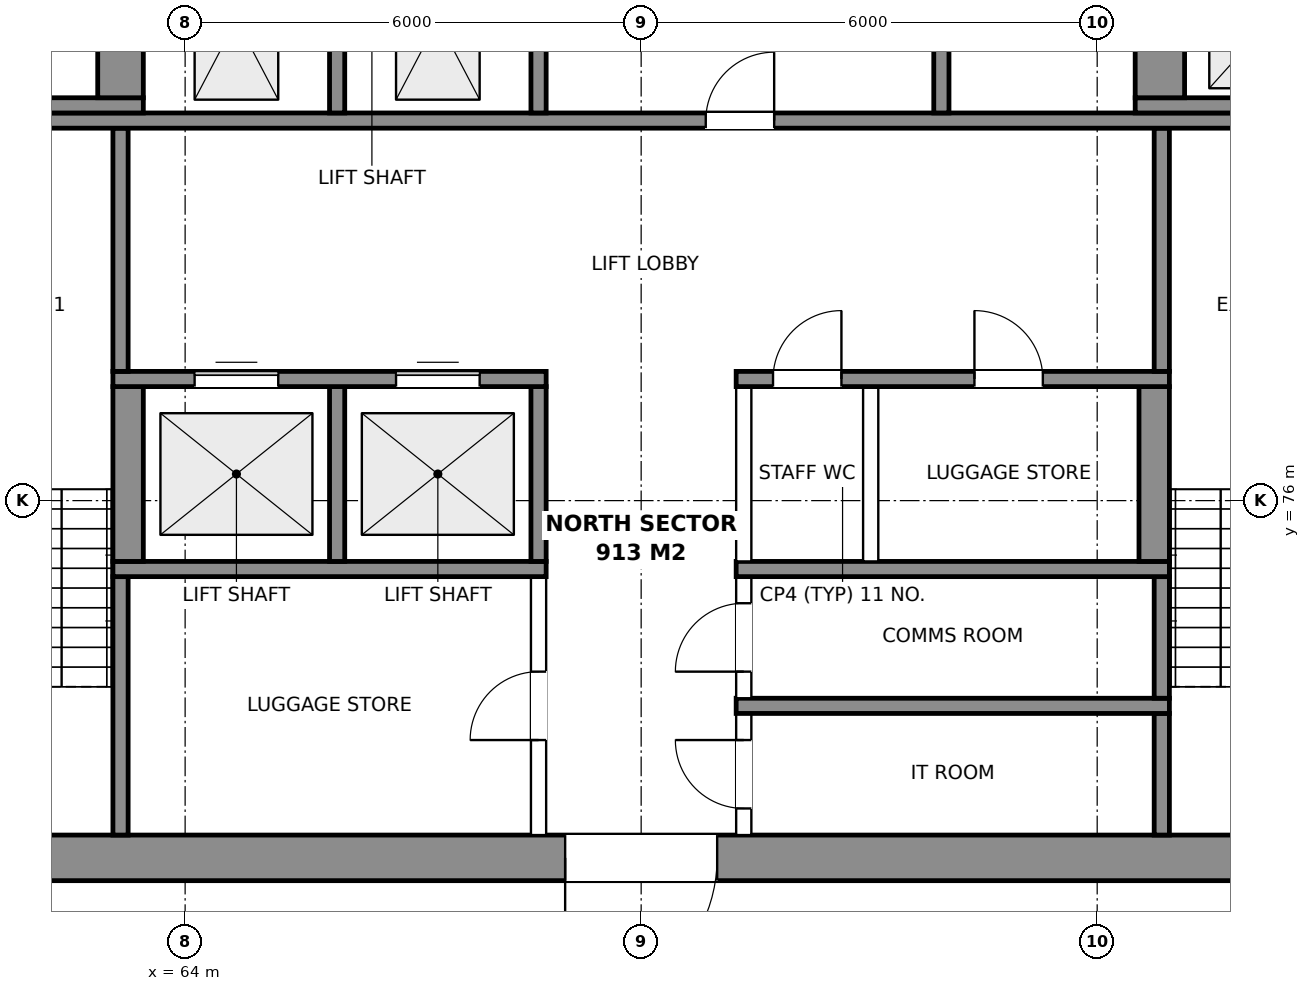
"""IFC4 building model, lengths in metres.
Left out: names, types, materials, properties, quantities, classifications, styles, units other than length and angle.
Written with IfcOpenShell. Run it as: python <this file> out.ifc"""

import sys

from ifc_helpers import new_model, si_unit, direction, frame, frame_2d, origin, place, context, subcontext, project, spatial, rectangle, extrude, element, fill, save


model = new_model("IFC4")
c1 = context("Model", 3, precision=1e-05, world=origin(), true_north=direction((0.0, 1.0)))
c2 = subcontext(c1, "Body", "Model", "MODEL_VIEW")
j1 = project(units=[si_unit("LENGTHUNIT", "METRE"), si_unit("PLANEANGLEUNIT", "RADIAN")], contexts=[c1])
p1 = place(None, origin())
s1 = spatial("IfcSite", under=j1, at=p1, CompositionType="ELEMENT")
p2 = place(p1, origin())
s2 = spatial("IfcBuilding", under=s1, at=p2, CompositionType="ELEMENT")
p3 = place(p2, frame((0.0, 0.0, 313.9)))
s3 = spatial("IfcBuildingStorey", under=s2, at=p3, CompositionType="ELEMENT", Elevation=313.9)
p4 = place(p3, frame((59.0, 71.3, 0.0), z_axis=(0.0, 0.0, 1.0), x_axis=(1.0, 0.0, 0.0)))
e1 = element("IfcWall", 1, at=p4, inside=s3, PredefinedType="SHEAR", context=c2, shape_type="SweptSolid", body=[
    extrude(rectangle(XDim=22.0, YDim=0.6, at=frame_2d((11.0, 0.0))), origin(), (0.0, 0.0, 1.0), 3.9),
])
p5 = place(p4, frame((2.025, 0.0, 0.0)))
e2 = element("IfcOpeningElement", 2, at=p5, cuts=e1, PredefinedType="OPENING", context=c2, shape_type="SweptSolid", body=[
    extrude(rectangle(XDim=1.2, YDim=2.1, at=frame_2d((0.6, 1.05))), frame((0.0, 0.31, 0.0), z_axis=(0.0, -1.0, 0.0), x_axis=(1.0, 0.0, 0.0)), (0.0, 0.0, 1.0), 0.62),
])
p6 = place(p4, frame((18.775, 0.0, 0.0)))
e3 = element("IfcOpeningElement", 3, at=p6, cuts=e1, PredefinedType="OPENING", context=c2, shape_type="SweptSolid", body=[
    extrude(rectangle(XDim=1.2, YDim=2.1, at=frame_2d((0.6, 1.05))), frame((0.0, 0.31, 0.0), z_axis=(0.0, -1.0, 0.0), x_axis=(1.0, 0.0, 0.0)), (0.0, 0.0, 1.0), 0.62),
])
p7 = place(p4, frame((10.0, 0.0, 0.0)))
e4 = element("IfcOpeningElement", 4, at=p7, cuts=e1, PredefinedType="OPENING", context=c2, shape_type="SweptSolid", body=[
    extrude(rectangle(XDim=2.0, YDim=2.1, at=frame_2d((1.0, 1.05))), frame((0.0, 0.31, 0.0), z_axis=(0.0, -1.0, 0.0), x_axis=(1.0, 0.0, 0.0)), (0.0, 0.0, 1.0), 0.62),
])
p8 = place(p3, frame((63.15, 71.6, 0.0), z_axis=(0.0, 0.0, 1.0), x_axis=(0.0, 1.0, 0.0)))
e5 = element("IfcWall", 5, at=p8, inside=s3, PredefinedType="SHEAR", context=c2, shape_type="SweptSolid", body=[
    extrude(rectangle(XDim=3.4, YDim=0.2, at=frame_2d((1.7, 0.0))), origin(), (0.0, 0.0, 1.0), 3.9),
])
p9 = place(p3, frame((68.65, 71.6, 0.0), z_axis=(0.0, 0.0, 1.0), x_axis=(0.0, 1.0, 0.0)))
e6 = element("IfcWall", 6, at=p9, inside=s3, PredefinedType="PARTITIONING", context=c2, shape_type="SweptSolid", body=[
    extrude(rectangle(XDim=3.4, YDim=0.2, at=frame_2d((1.7, 0.0))), origin(), (0.0, 0.0, 1.0), 3.6),
])
p10 = place(p9, frame((1.25, 0.0, 0.0)))
e7 = element("IfcOpeningElement", 7, at=p10, cuts=e6, PredefinedType="OPENING", context=c2, shape_type="SweptSolid", body=[
    extrude(rectangle(XDim=0.9, YDim=2.1, at=frame_2d((0.45, 1.05))), frame((0.0, 0.11, 0.0), z_axis=(0.0, -1.0, 0.0), x_axis=(1.0, 0.0, 0.0)), (0.0, 0.0, 1.0), 0.22),
])
p11 = place(p3, frame((71.35, 71.6, 0.0), z_axis=(0.0, 0.0, 1.0), x_axis=(0.0, 1.0, 0.0)))
e8 = element("IfcWall", 8, at=p11, inside=s3, PredefinedType="PARTITIONING", context=c2, shape_type="SweptSolid", body=[
    extrude(rectangle(XDim=1.6, YDim=0.2, at=frame_2d((0.8, 0.0))), origin(), (0.0, 0.0, 1.0), 3.6),
])
p12 = place(p11, frame((0.35, 0.0, 0.0)))
e9 = element("IfcOpeningElement", 9, at=p12, cuts=e8, PredefinedType="OPENING", context=c2, shape_type="SweptSolid", body=[
    extrude(rectangle(XDim=0.9, YDim=2.1, at=frame_2d((0.45, 1.05))), frame((0.0, 0.11, 0.0), z_axis=(0.0, -1.0, 0.0), x_axis=(1.0, 0.0, 0.0)), (0.0, 0.0, 1.0), 0.22),
])
p13 = place(p3, frame((76.85, 71.6, 0.0), z_axis=(0.0, 0.0, 1.0), x_axis=(0.0, 1.0, 0.0)))
e10 = element("IfcWall", 10, at=p13, inside=s3, PredefinedType="SHEAR", context=c2, shape_type="SweptSolid", body=[
    extrude(rectangle(XDim=1.6, YDim=0.2, at=frame_2d((0.8, 0.0))), origin(), (0.0, 0.0, 1.0), 3.9),
])
p14 = place(p3, frame((71.25, 73.3, 0.0), z_axis=(0.0, 0.0, 1.0), x_axis=(1.0, 0.0, 0.0)))
e11 = element("IfcWall", 11, at=p14, inside=s3, PredefinedType="SHEAR", context=c2, shape_type="SweptSolid", body=[
    extrude(rectangle(XDim=5.7, YDim=0.2, at=frame_2d((2.85, 0.0))), origin(), (0.0, 0.0, 1.0), 3.9),
])
p15 = place(p3, frame((71.35, 73.4, 0.0), z_axis=(0.0, 0.0, 1.0), x_axis=(0.0, 1.0, 0.0)))
e12 = element("IfcWall", 12, at=p15, inside=s3, PredefinedType="PARTITIONING", context=c2, shape_type="SweptSolid", body=[
    extrude(rectangle(XDim=1.6, YDim=0.2, at=frame_2d((0.8, 0.0))), origin(), (0.0, 0.0, 1.0), 3.6),
])
p16 = place(p15, frame((0.35, 0.0, 0.0)))
e13 = element("IfcOpeningElement", 13, at=p16, cuts=e12, PredefinedType="OPENING", context=c2, shape_type="SweptSolid", body=[
    extrude(rectangle(XDim=0.9, YDim=2.1, at=frame_2d((0.45, 1.05))), frame((0.0, 0.11, 0.0), z_axis=(0.0, -1.0, 0.0), x_axis=(1.0, 0.0, 0.0)), (0.0, 0.0, 1.0), 0.22),
])
p17 = place(p3, frame((76.85, 73.4, 0.0), z_axis=(0.0, 0.0, 1.0), x_axis=(0.0, 1.0, 0.0)))
e14 = element("IfcWall", 14, at=p17, inside=s3, PredefinedType="SHEAR", context=c2, shape_type="SweptSolid", body=[
    extrude(rectangle(XDim=1.6, YDim=0.2, at=frame_2d((0.8, 0.0))), origin(), (0.0, 0.0, 1.0), 3.9),
])
for number, where, z_axis, x_axis in (
    (15, (63.05, 75.1, 0.0), (0.0, 0.0, 1.0), (1.0, 0.0, 0.0)),
    (16, (71.25, 75.1, 0.0), (0.0, 0.0, 1.0), (1.0, 0.0, 0.0)),
):
    element("IfcWall", number, at=place(p3, frame(where, z_axis=z_axis, x_axis=x_axis)), inside=s3, PredefinedType="SHEAR", context=c2, shape_type="SweptSolid", body=[
        extrude(rectangle(XDim=5.7, YDim=0.2, at=frame_2d((2.85, 0.0))), origin(), (0.0, 0.0, 1.0), 3.9),
    ])
p18 = place(p3, frame((63.25, 75.2, 0.0), z_axis=(0.0, 0.0, 1.0), x_axis=(0.0, 1.0, 0.0)))
e17 = element("IfcWall", 17, at=p18, inside=s3, PredefinedType="SHEAR", context=c2, shape_type="SweptSolid", body=[
    extrude(rectangle(XDim=2.3, YDim=0.4, at=frame_2d((1.15, 0.0))), origin(), (0.0, 0.0, 1.0), 3.9),
])
for number, where, z_axis, x_axis in (
    (18, (66.0, 75.2, 0.0), (0.0, 0.0, 1.0), (0.0, 1.0, 0.0)),
    (19, (68.65, 75.2, 0.0), (0.0, 0.0, 1.0), (0.0, 1.0, 0.0)),
):
    element("IfcWall", number, at=place(p3, frame(where, z_axis=z_axis, x_axis=x_axis)), inside=s3, PredefinedType="SHEAR", context=c2, shape_type="SweptSolid", body=[
        extrude(rectangle(XDim=2.3, YDim=0.2, at=frame_2d((1.15, 0.0))), origin(), (0.0, 0.0, 1.0), 3.9),
    ])
for number, where, z_axis, x_axis in (
    (20, (71.35, 75.2, 0.0), (0.0, 0.0, 1.0), (0.0, 1.0, 0.0)),
    (21, (73.02, 75.2, 0.0), (0.0, 0.0, 1.0), (0.0, 1.0, 0.0)),
):
    element("IfcWall", number, at=place(p3, frame(where, z_axis=z_axis, x_axis=x_axis)), inside=s3, PredefinedType="PARTITIONING", context=c2, shape_type="SweptSolid", body=[
        extrude(rectangle(XDim=2.3, YDim=0.2, at=frame_2d((1.15, 0.0))), origin(), (0.0, 0.0, 1.0), 3.6),
    ])
p19 = place(p3, frame((76.75, 75.2, 0.0), z_axis=(0.0, 0.0, 1.0), x_axis=(0.0, 1.0, 0.0)))
e22 = element("IfcWall", 22, at=p19, inside=s3, PredefinedType="SHEAR", context=c2, shape_type="SweptSolid", body=[
    extrude(rectangle(XDim=2.3, YDim=0.4, at=frame_2d((1.15, 0.0))), origin(), (0.0, 0.0, 1.0), 3.9),
])
p20 = place(p3, frame((63.05, 77.6, 0.0), z_axis=(0.0, 0.0, 1.0), x_axis=(1.0, 0.0, 0.0)))
e23 = element("IfcWall", 23, at=p20, inside=s3, PredefinedType="SHEAR", context=c2, shape_type="SweptSolid", body=[
    extrude(rectangle(XDim=5.7, YDim=0.2, at=frame_2d((2.85, 0.0))), origin(), (0.0, 0.0, 1.0), 3.9),
])
p21 = place(p20, frame((1.075, 0.0, 0.0)))
e24 = element("IfcOpeningElement", 24, at=p21, cuts=e23, PredefinedType="OPENING", context=c2, shape_type="SweptSolid", body=[
    extrude(rectangle(XDim=1.1, YDim=2.1, at=frame_2d((0.55, 1.05))), frame((0.0, 0.11, 0.0), z_axis=(0.0, -1.0, 0.0), x_axis=(1.0, 0.0, 0.0)), (0.0, 0.0, 1.0), 0.22),
])
p22 = place(p20, frame((3.725, 0.0, 0.0)))
e25 = element("IfcOpeningElement", 25, at=p22, cuts=e23, PredefinedType="OPENING", context=c2, shape_type="SweptSolid", body=[
    extrude(rectangle(XDim=1.1, YDim=2.1, at=frame_2d((0.55, 1.05))), frame((0.0, 0.11, 0.0), z_axis=(0.0, -1.0, 0.0), x_axis=(1.0, 0.0, 0.0)), (0.0, 0.0, 1.0), 0.22),
])
p23 = place(p3, frame((71.25, 77.6, 0.0), z_axis=(0.0, 0.0, 1.0), x_axis=(1.0, 0.0, 0.0)))
e26 = element("IfcWall", 26, at=p23, inside=s3, PredefinedType="SHEAR", context=c2, shape_type="SweptSolid", body=[
    extrude(rectangle(XDim=5.7, YDim=0.2, at=frame_2d((2.85, 0.0))), origin(), (0.0, 0.0, 1.0), 3.9),
])
p24 = place(p23, frame((0.485, 0.0, 0.0)))
e27 = element("IfcOpeningElement", 27, at=p24, cuts=e26, PredefinedType="OPENING", context=c2, shape_type="SweptSolid", body=[
    extrude(rectangle(XDim=0.9, YDim=2.1, at=frame_2d((0.45, 1.05))), frame((0.0, 0.11, 0.0), z_axis=(0.0, -1.0, 0.0), x_axis=(1.0, 0.0, 0.0)), (0.0, 0.0, 1.0), 0.22),
])
p25 = place(p23, frame((3.135, 0.0, 0.0)))
e28 = element("IfcOpeningElement", 28, at=p25, cuts=e26, PredefinedType="OPENING", context=c2, shape_type="SweptSolid", body=[
    extrude(rectangle(XDim=0.9, YDim=2.1, at=frame_2d((0.45, 1.05))), frame((0.0, 0.11, 0.0), z_axis=(0.0, -1.0, 0.0), x_axis=(1.0, 0.0, 0.0)), (0.0, 0.0, 1.0), 0.22),
])
for number, where, z_axis, x_axis in (
    (29, (63.15, 77.7, 0.0), (0.0, 0.0, 1.0), (0.0, 1.0, 0.0)),
    (30, (76.85, 77.7, 0.0), (0.0, 0.0, 1.0), (0.0, 1.0, 0.0)),
):
    element("IfcWall", number, at=place(p3, frame(where, z_axis=z_axis, x_axis=x_axis)), inside=s3, PredefinedType="SHEAR", context=c2, shape_type="SweptSolid", body=[
        extrude(rectangle(XDim=3.2, YDim=0.2, at=frame_2d((1.6, 0.0))), origin(), (0.0, 0.0, 1.0), 3.9),
    ])
p26 = place(p3, frame((59.0, 81.0, 0.0), z_axis=(0.0, 0.0, 1.0), x_axis=(1.0, 0.0, 0.0)))
e31 = element("IfcWall", 31, at=p26, inside=s3, PredefinedType="SHEAR", context=c2, shape_type="SweptSolid", body=[
    extrude(rectangle(XDim=22.0, YDim=0.2, at=frame_2d((11.0, 0.0))), origin(), (0.0, 0.0, 1.0), 3.9),
])
p27 = place(p26, frame((11.85, 0.0, 0.0)))
e32 = element("IfcOpeningElement", 32, at=p27, cuts=e31, PredefinedType="OPENING", context=c2, shape_type="SweptSolid", body=[
    extrude(rectangle(XDim=0.9, YDim=2.1, at=frame_2d((0.45, 1.05))), frame((0.0, 0.11, 0.0), z_axis=(0.0, -1.0, 0.0), x_axis=(1.0, 0.0, 0.0)), (0.0, 0.0, 1.0), 0.22),
])
p28 = place(p3, frame((59.0, 81.2, 0.0), z_axis=(0.0, 0.0, 1.0), x_axis=(1.0, 0.0, 0.0)))
e33 = element("IfcWall", 33, at=p28, inside=s3, PredefinedType="SHEAR", context=c2, shape_type="SweptSolid", body=[
    extrude(rectangle(XDim=4.45, YDim=0.2, at=frame_2d((2.225, 0.0))), origin(), (0.0, 0.0, 1.0), 3.9),
])
for number, where, z_axis, x_axis in (
    (34, (66.0, 81.1, 0.0), (0.0, 0.0, 1.0), (0.0, 1.0, 0.0)),
    (35, (68.65, 81.1, 0.0), (0.0, 0.0, 1.0), (0.0, 1.0, 0.0)),
    (36, (73.95, 81.1, 0.0), (0.0, 0.0, 1.0), (0.0, 1.0, 0.0)),
):
    element("IfcWall", number, at=place(p3, frame(where, z_axis=z_axis, x_axis=x_axis)), inside=s3, PredefinedType="SHEAR", context=c2, shape_type="SweptSolid", body=[
        extrude(rectangle(XDim=2.45, YDim=0.2, at=frame_2d((1.225, 0.0))), origin(), (0.0, 0.0, 1.0), 3.9),
    ])
p29 = place(p3, frame((76.5, 81.2, 0.0), z_axis=(0.0, 0.0, 1.0), x_axis=(1.0, 0.0, 0.0)))
e37 = element("IfcWall", 37, at=p29, inside=s3, PredefinedType="SHEAR", context=c2, shape_type="SweptSolid", body=[
    extrude(rectangle(XDim=4.5, YDim=0.2, at=frame_2d((2.25, 0.0))), origin(), (0.0, 0.0, 1.0), 3.9),
])
p30 = place(p3, frame((63.15, 81.3, 0.0), z_axis=(0.0, 0.0, 1.0), x_axis=(0.0, 1.0, 0.0)))
e38 = element("IfcWall", 38, at=p30, inside=s3, PredefinedType="SHEAR", context=c2, shape_type="SweptSolid", body=[
    extrude(rectangle(XDim=2.25, YDim=0.6, at=frame_2d((1.125, 0.0))), origin(), (0.0, 0.0, 1.0), 3.9),
])
p31 = place(p3, frame((76.825, 81.3, 0.0), z_axis=(0.0, 0.0, 1.0), x_axis=(0.0, 1.0, 0.0)))
e39 = element("IfcWall", 39, at=p31, inside=s3, PredefinedType="SHEAR", context=c2, shape_type="SweptSolid", body=[
    extrude(rectangle(XDim=2.25, YDim=0.65, at=frame_2d((1.125, 0.0))), origin(), (0.0, 0.0, 1.0), 3.9),
])
p32 = place(p7, frame((2.0, 0.0, 0.0), z_axis=(0.0, 0.0, 1.0), x_axis=(-1.0, 0.0, 0.0)))
e40 = element("IfcDoor", 40, at=p32, inside=s3, OperationType="DOUBLE_DOOR_SINGLE_SWING", PredefinedType="DOOR", context=c2, shape_type="SweptSolid", body=[
    extrude(rectangle(XDim=2.0, YDim=2.1, at=frame_2d((1.0, 1.05))), frame((0.0, 0.025, 0.0), z_axis=(0.0, -1.0, 0.0), x_axis=(1.0, 0.0, 0.0)), (0.0, 0.0, 1.0), 0.05),
])
fill(e4, e40)
p33 = place(p10, origin())
e41 = element("IfcDoor", 41, at=p33, inside=s3, OperationType="SINGLE_SWING_LEFT", PredefinedType="DOOR", context=c2, shape_type="SweptSolid", body=[
    extrude(rectangle(XDim=0.9, YDim=2.1, at=frame_2d((0.45, 1.05))), frame((0.0, 0.025, 0.0), z_axis=(0.0, -1.0, 0.0), x_axis=(1.0, 0.0, 0.0)), (0.0, 0.0, 1.0), 0.05),
])
fill(e7, e41)
p34 = place(p12, origin())
e42 = element("IfcDoor", 42, at=p34, inside=s3, OperationType="SINGLE_SWING_RIGHT", PredefinedType="DOOR", context=c2, shape_type="SweptSolid", body=[
    extrude(rectangle(XDim=0.9, YDim=2.1, at=frame_2d((0.45, 1.05))), frame((0.0, 0.025, 0.0), z_axis=(0.0, -1.0, 0.0), x_axis=(1.0, 0.0, 0.0)), (0.0, 0.0, 1.0), 0.05),
])
fill(e9, e42)
p35 = place(p16, origin())
e43 = element("IfcDoor", 43, at=p35, inside=s3, OperationType="SINGLE_SWING_LEFT", PredefinedType="DOOR", context=c2, shape_type="SweptSolid", body=[
    extrude(rectangle(XDim=0.9, YDim=2.1, at=frame_2d((0.45, 1.05))), frame((0.0, 0.025, 0.0), z_axis=(0.0, -1.0, 0.0), x_axis=(1.0, 0.0, 0.0)), (0.0, 0.0, 1.0), 0.05),
])
fill(e13, e43)
p36 = place(p21, origin())
e44 = element("IfcDoor", 44, at=p36, inside=s3, OperationType="DOUBLE_DOOR_SLIDING", PredefinedType="DOOR", context=c2, shape_type="SweptSolid", body=[
    extrude(rectangle(XDim=1.1, YDim=2.1, at=frame_2d((0.55, 1.05))), frame((0.0, 0.025, 0.0), z_axis=(0.0, -1.0, 0.0), x_axis=(1.0, 0.0, 0.0)), (0.0, 0.0, 1.0), 0.05),
])
fill(e24, e44)
p37 = place(p22, origin())
e45 = element("IfcDoor", 45, at=p37, inside=s3, OperationType="DOUBLE_DOOR_SLIDING", PredefinedType="DOOR", context=c2, shape_type="SweptSolid", body=[
    extrude(rectangle(XDim=1.1, YDim=2.1, at=frame_2d((0.55, 1.05))), frame((0.0, 0.025, 0.0), z_axis=(0.0, -1.0, 0.0), x_axis=(1.0, 0.0, 0.0)), (0.0, 0.0, 1.0), 0.05),
])
fill(e25, e45)
p38 = place(p24, origin())
e46 = element("IfcDoor", 46, at=p38, inside=s3, OperationType="SINGLE_SWING_RIGHT", PredefinedType="DOOR", context=c2, shape_type="SweptSolid", body=[
    extrude(rectangle(XDim=0.9, YDim=2.1, at=frame_2d((0.45, 1.05))), frame((0.0, 0.025, 0.0), z_axis=(0.0, -1.0, 0.0), x_axis=(1.0, 0.0, 0.0)), (0.0, 0.0, 1.0), 0.05),
])
fill(e27, e46)
p39 = place(p25, origin())
e47 = element("IfcDoor", 47, at=p39, inside=s3, OperationType="SINGLE_SWING_LEFT", PredefinedType="DOOR", context=c2, shape_type="SweptSolid", body=[
    extrude(rectangle(XDim=0.9, YDim=2.1, at=frame_2d((0.45, 1.05))), frame((0.0, 0.025, 0.0), z_axis=(0.0, -1.0, 0.0), x_axis=(1.0, 0.0, 0.0)), (0.0, 0.0, 1.0), 0.05),
])
fill(e28, e47)
p40 = place(p27, origin())
e48 = element("IfcDoor", 48, at=p40, inside=s3, OperationType="SINGLE_SWING_RIGHT", PredefinedType="DOOR", context=c2, shape_type="SweptSolid", body=[
    extrude(rectangle(XDim=0.9, YDim=2.1, at=frame_2d((0.45, 1.05))), frame((0.0, 0.025, 0.0), z_axis=(0.0, -1.0, 0.0), x_axis=(1.0, 0.0, 0.0)), (0.0, 0.0, 1.0), 0.05),
])
fill(e32, e48)
save(model, sys.argv[1])
